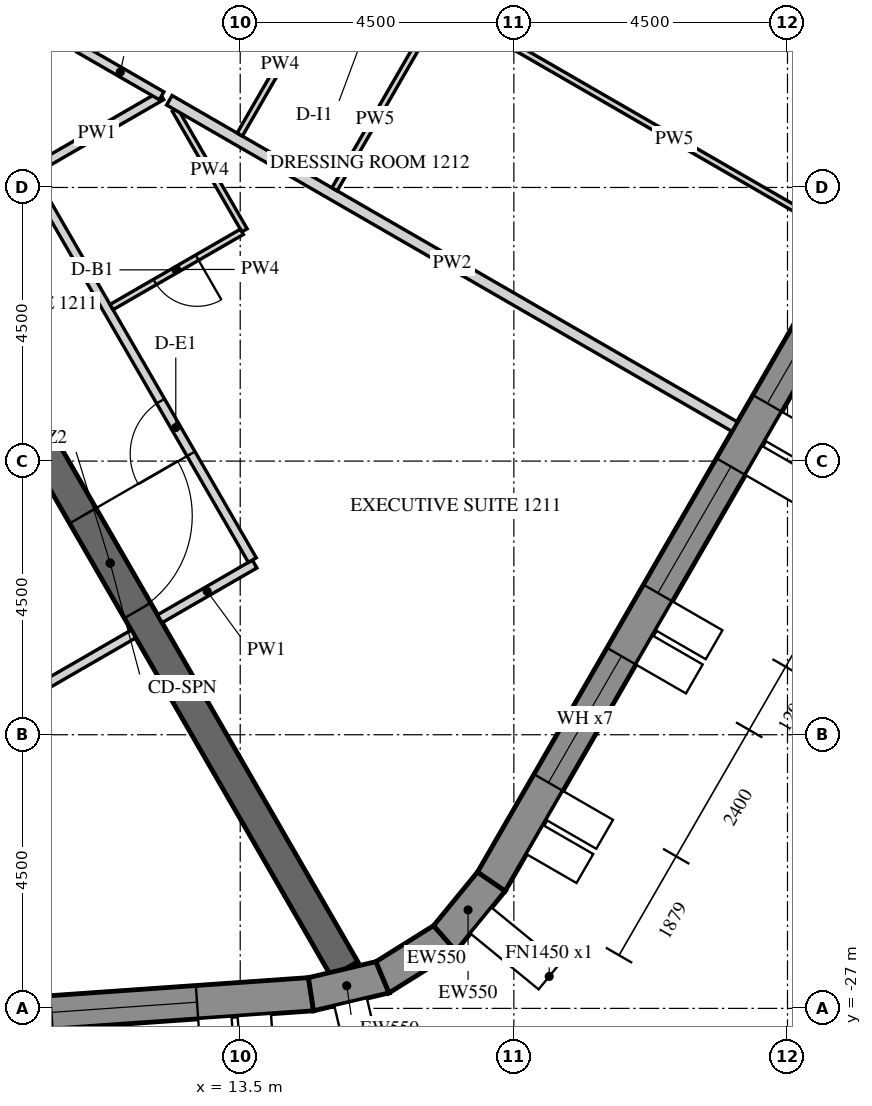
"""IFC4 building model, lengths in metres.
Left out: names, types, materials, properties, quantities, classifications, styles, units other than length and angle.
Written with IfcOpenShell. Run it as: python <this file> out.ifc"""

import sys

from ifc_helpers import new_model, si_unit, direction, frame, frame_2d, origin, place, context, subcontext, project, spatial, polyline, rectangle, outline, extrude, element, fill, save


model = new_model("IFC4")
c1 = context("Model", 3, precision=1e-05, world=origin(), true_north=direction((0.0, 1.0)))
c2 = subcontext(c1, "Body", "Model", "MODEL_VIEW")
j1 = project(units=[si_unit("LENGTHUNIT", "METRE"), si_unit("PLANEANGLEUNIT", "RADIAN")], contexts=[c1])
p1 = place(None, origin())
s1 = spatial("IfcSite", under=j1, at=p1, CompositionType="ELEMENT")
p2 = place(p1, origin())
s2 = spatial("IfcBuilding", under=s1, at=p2, CompositionType="ELEMENT")
p3 = place(p2, frame((0.0, 0.0, 164.4)))
s3 = spatial("IfcBuildingStorey", under=s2, at=p3, CompositionType="ELEMENT", Elevation=164.4)
p4 = place(p3, frame((-13.026, -28.704, -0.15), z_axis=(0.0, 0.0, 1.0), x_axis=(0.99756406806, 0.069756219185, 0.0)))
e1 = element("IfcWall", 1, at=p4, inside=s3, PredefinedType="SOLIDWALL", context=c2, shape_type="SweptSolid", body=[
    extrude(outline(polyline([(-0.026, -0.275), (27.78, -0.275), (27.735, 0.275), (0.026, 0.275), (-0.026, -0.275)])), origin(), (0.0, 0.0, 1.0), 3.9),
])
p5 = place(p4, frame((1.879, 0.0, 1.05)))
e2 = element("IfcOpeningElement", 2, at=p5, cuts=e1, PredefinedType="OPENING", context=c2, shape_type="SweptSolid", body=[
    extrude(rectangle(XDim=2.4, YDim=2.4, at=frame_2d((1.2, 1.2))), frame((0.0, 0.285, 0.0), z_axis=(0.0, -1.0, 0.0), x_axis=(1.0, 0.0, 0.0)), (0.0, 0.0, 1.0), 0.57),
])
p6 = place(p4, frame((5.479, 0.0, 1.05)))
e3 = element("IfcOpeningElement", 3, at=p6, cuts=e1, PredefinedType="OPENING", context=c2, shape_type="SweptSolid", body=[
    extrude(rectangle(XDim=2.4, YDim=2.4, at=frame_2d((1.2, 1.2))), frame((0.0, 0.285, 0.0), z_axis=(0.0, -1.0, 0.0), x_axis=(1.0, 0.0, 0.0)), (0.0, 0.0, 1.0), 0.57),
])
p7 = place(p4, frame((9.079, 0.0, 1.05)))
e4 = element("IfcOpeningElement", 4, at=p7, cuts=e1, PredefinedType="OPENING", context=c2, shape_type="SweptSolid", body=[
    extrude(rectangle(XDim=2.4, YDim=2.4, at=frame_2d((1.2, 1.2))), frame((0.0, 0.285, 0.0), z_axis=(0.0, -1.0, 0.0), x_axis=(1.0, 0.0, 0.0)), (0.0, 0.0, 1.0), 0.57),
])
p8 = place(p4, frame((12.679, 0.0, 1.05)))
e5 = element("IfcOpeningElement", 5, at=p8, cuts=e1, PredefinedType="OPENING", context=c2, shape_type="SweptSolid", body=[
    extrude(rectangle(XDim=2.4, YDim=2.4, at=frame_2d((1.2, 1.2))), frame((0.0, 0.285, 0.0), z_axis=(0.0, -1.0, 0.0), x_axis=(1.0, 0.0, 0.0)), (0.0, 0.0, 1.0), 0.57),
])
p9 = place(p4, frame((16.279, 0.0, 1.05)))
e6 = element("IfcOpeningElement", 6, at=p9, cuts=e1, PredefinedType="OPENING", context=c2, shape_type="SweptSolid", body=[
    extrude(rectangle(XDim=2.4, YDim=2.4, at=frame_2d((1.2, 1.2))), frame((0.0, 0.285, 0.0), z_axis=(0.0, -1.0, 0.0), x_axis=(1.0, 0.0, 0.0)), (0.0, 0.0, 1.0), 0.57),
])
p10 = place(p4, frame((19.879, 0.0, 1.05)))
e7 = element("IfcOpeningElement", 7, at=p10, cuts=e1, PredefinedType="OPENING", context=c2, shape_type="SweptSolid", body=[
    extrude(rectangle(XDim=2.4, YDim=2.4, at=frame_2d((1.2, 1.2))), frame((0.0, 0.285, 0.0), z_axis=(0.0, -1.0, 0.0), x_axis=(1.0, 0.0, 0.0)), (0.0, 0.0, 1.0), 0.57),
])
p11 = place(p4, frame((23.479, 0.0, 1.05)))
e8 = element("IfcOpeningElement", 8, at=p11, cuts=e1, PredefinedType="OPENING", context=c2, shape_type="SweptSolid", body=[
    extrude(rectangle(XDim=2.4, YDim=2.4, at=frame_2d((1.2, 1.2))), frame((0.0, 0.285, 0.0), z_axis=(0.0, -1.0, 0.0), x_axis=(1.0, 0.0, 0.0)), (0.0, 0.0, 1.0), 0.57),
])
p12 = place(p3, frame((14.664, -26.767, -0.15), z_axis=(0.0, 0.0, 1.0), x_axis=(0.973063591128, 0.230536868247, 0.0)))
e9 = element("IfcWall", 9, at=p12, inside=s3, PredefinedType="SOLIDWALL", context=c2, shape_type="SweptSolid", body=[
    extrude(outline(polyline([(-0.022, -0.275), (1.253, -0.275), (1.163, 0.275), (0.022, 0.275), (-0.022, -0.275)])), origin(), (0.0, 0.0, 1.0), 3.9),
])
p13 = place(p3, frame((15.84, -26.489, -0.15), z_axis=(0.0, 0.0, 1.0), x_axis=(0.848009655012, 0.52998077796, 0.0)))
e10 = element("IfcWall", 10, at=p13, inside=s3, PredefinedType="SOLIDWALL", context=c2, shape_type="SweptSolid", body=[
    extrude(outline(polyline([(-0.045, -0.275), (1.253, -0.275), (1.163, 0.275), (0.045, 0.275), (-0.045, -0.275)])), origin(), (0.0, 0.0, 1.0), 3.9),
])
p14 = place(p3, frame((16.864, -25.848, -0.15), z_axis=(0.0, 0.0, 1.0), x_axis=(0.633842757806, 0.773461930787, 0.0)))
e11 = element("IfcWall", 11, at=p14, inside=s3, PredefinedType="SOLIDWALL", context=c2, shape_type="SweptSolid", body=[
    extrude(outline(polyline([(-0.045, -0.275), (1.231, -0.275), (1.186, 0.275), (0.045, 0.275), (-0.045, -0.275)])), origin(), (0.0, 0.0, 1.0), 3.9),
])
p15 = place(p3, frame((17.63, -24.914, -0.15), z_axis=(0.0, 0.0, 1.0), x_axis=(0.499998569178, 0.866026229868, 0.0)))
e12 = element("IfcWall", 12, at=p15, inside=s3, PredefinedType="SOLIDWALL", context=c2, shape_type="SweptSolid", body=[
    extrude(outline(polyline([(-0.022, -0.275), (27.783, -0.275), (27.732, 0.275), (0.022, 0.275), (-0.022, -0.275)])), origin(), (0.0, 0.0, 1.0), 3.9),
])
p16 = place(p15, frame((1.879, 0.0, 1.05)))
e13 = element("IfcOpeningElement", 13, at=p16, cuts=e12, PredefinedType="OPENING", context=c2, shape_type="SweptSolid", body=[
    extrude(rectangle(XDim=2.4, YDim=2.4, at=frame_2d((1.2, 1.2))), frame((0.0, 0.285, 0.0), z_axis=(0.0, -1.0, 0.0), x_axis=(1.0, 0.0, 0.0)), (0.0, 0.0, 1.0), 0.57),
])
p17 = place(p15, frame((5.479, 0.0, 1.05)))
e14 = element("IfcOpeningElement", 14, at=p17, cuts=e12, PredefinedType="OPENING", context=c2, shape_type="SweptSolid", body=[
    extrude(rectangle(XDim=2.4, YDim=2.4, at=frame_2d((1.2, 1.2))), frame((0.0, 0.285, 0.0), z_axis=(0.0, -1.0, 0.0), x_axis=(1.0, 0.0, 0.0)), (0.0, 0.0, 1.0), 0.57),
])
p18 = place(p15, frame((9.079, 0.0, 1.05)))
e15 = element("IfcOpeningElement", 15, at=p18, cuts=e12, PredefinedType="OPENING", context=c2, shape_type="SweptSolid", body=[
    extrude(rectangle(XDim=2.4, YDim=2.4, at=frame_2d((1.2, 1.2))), frame((0.0, 0.285, 0.0), z_axis=(0.0, -1.0, 0.0), x_axis=(1.0, 0.0, 0.0)), (0.0, 0.0, 1.0), 0.57),
])
p19 = place(p15, frame((12.679, 0.0, 1.05)))
e16 = element("IfcOpeningElement", 16, at=p19, cuts=e12, PredefinedType="OPENING", context=c2, shape_type="SweptSolid", body=[
    extrude(rectangle(XDim=2.4, YDim=2.4, at=frame_2d((1.2, 1.2))), frame((0.0, 0.285, 0.0), z_axis=(0.0, -1.0, 0.0), x_axis=(1.0, 0.0, 0.0)), (0.0, 0.0, 1.0), 0.57),
])
p20 = place(p15, frame((16.279, 0.0, 1.05)))
e17 = element("IfcOpeningElement", 17, at=p20, cuts=e12, PredefinedType="OPENING", context=c2, shape_type="SweptSolid", body=[
    extrude(rectangle(XDim=2.4, YDim=2.4, at=frame_2d((1.2, 1.2))), frame((0.0, 0.285, 0.0), z_axis=(0.0, -1.0, 0.0), x_axis=(1.0, 0.0, 0.0)), (0.0, 0.0, 1.0), 0.57),
])
p21 = place(p15, frame((19.879, 0.0, 1.05)))
e18 = element("IfcOpeningElement", 18, at=p21, cuts=e12, PredefinedType="OPENING", context=c2, shape_type="SweptSolid", body=[
    extrude(rectangle(XDim=2.4, YDim=2.4, at=frame_2d((1.2, 1.2))), frame((0.0, 0.285, 0.0), z_axis=(0.0, -1.0, 0.0), x_axis=(1.0, 0.0, 0.0)), (0.0, 0.0, 1.0), 0.57),
])
p22 = place(p15, frame((23.479, 0.0, 1.05)))
e19 = element("IfcOpeningElement", 19, at=p22, cuts=e12, PredefinedType="OPENING", context=c2, shape_type="SweptSolid", body=[
    extrude(rectangle(XDim=2.4, YDim=2.4, at=frame_2d((1.2, 1.2))), frame((0.0, 0.285, 0.0), z_axis=(0.0, -1.0, 0.0), x_axis=(1.0, 0.0, 0.0)), (0.0, 0.0, 1.0), 0.57),
])
p23 = place(p3, frame((7.361, -12.75, -0.15), z_axis=(0.0, 0.0, 1.0), x_axis=(0.50000571537, 0.866022103989, 0.0)))
e20 = element("IfcWall", 20, at=p23, inside=s3, PredefinedType="SHEAR", context=c2, shape_type="SweptSolid", body=[
    extrude(outline(polyline([(-0.144, -0.25), (14.867, -0.25), (14.578, 0.25), (0.144, 0.25), (-0.144, -0.25)])), origin(), (0.0, 0.0, 1.0), 3.9),
])
p24 = place(p23, frame((6.49, 0.0, 0.15)))
e21 = element("IfcOpeningElement", 21, at=p24, cuts=e20, PredefinedType="OPENING", context=c2, shape_type="SweptSolid", body=[
    extrude(rectangle(XDim=1.8, YDim=2.4, at=frame_2d((0.9, 1.2))), frame((0.0, 0.26, 0.0), z_axis=(0.0, -1.0, 0.0), x_axis=(1.0, 0.0, 0.0)), (0.0, 0.0, 1.0), 0.52),
])
p25 = place(p3, frame((7.506, -13.0, -0.15), z_axis=(0.0, 0.0, 1.0), x_axis=(0.499988271576, -0.866032175087, 0.0)))
e22 = element("IfcWall", 22, at=p25, inside=s3, PredefinedType="SHEAR", context=c2, shape_type="SweptSolid", body=[
    extrude(rectangle(XDim=15.424, YDim=0.5, at=frame_2d((7.712, 0.0))), origin(), (0.0, 0.0, 1.0), 3.9),
])
p26 = place(p25, frame((6.812, 0.0, 0.15)))
e23 = element("IfcOpeningElement", 23, at=p26, cuts=e22, PredefinedType="OPENING", context=c2, shape_type="SweptSolid", body=[
    extrude(rectangle(XDim=1.8, YDim=2.4, at=frame_2d((0.9, 1.2))), frame((0.0, 0.26, 0.0), z_axis=(0.0, -1.0, 0.0), x_axis=(1.0, 0.0, 0.0)), (0.0, 0.0, 1.0), 0.52),
])
p27 = place(p3, frame((10.251, -21.705, 0.0), z_axis=(0.0, 0.0, 1.0), x_axis=(0.866013532718, 0.500020560727, 0.0)))
e24 = element("IfcWall", 24, at=p27, inside=s3, PredefinedType="PARTITIONING", context=c2, shape_type="SweptSolid", body=[
    extrude(rectangle(XDim=1.725, YDim=0.15, at=frame_2d((0.863, 0.0))), origin(), (0.0, 0.0, 1.0), 2.988),
])
p28 = place(p3, frame((12.178, -20.593, 0.0), z_axis=(0.0, 0.0, 1.0), x_axis=(0.866047807691, 0.499961193289, 0.0)))
e25 = element("IfcWall", 25, at=p28, inside=s3, PredefinedType="PARTITIONING", context=c2, shape_type="SweptSolid", body=[
    extrude(rectangle(XDim=1.8, YDim=0.15, at=frame_2d((0.9, 0.0))), origin(), (0.0, 0.0, 1.0), 2.988),
])
p29 = place(p3, frame((13.699, -19.628, 0.0), z_axis=(0.0, 0.0, 1.0), x_axis=(-0.499995202058, 0.86602817386, 0.0)))
e26 = element("IfcWall", 26, at=p29, inside=s3, PredefinedType="PARTITIONING", context=c2, shape_type="SweptSolid", body=[
    extrude(rectangle(XDim=7.361, YDim=0.15, at=frame_2d((3.68, 0.0))), origin(), (0.0, 0.0, 1.0), 2.988),
])
p30 = place(p29, frame((2.018, 0.0, 0.0)))
e27 = element("IfcOpeningElement", 27, at=p30, cuts=e26, PredefinedType="OPENING", context=c2, shape_type="SweptSolid", body=[
    extrude(rectangle(XDim=1.0, YDim=2.1, at=frame_2d((0.5, 1.05))), frame((0.0, 0.085, 0.0), z_axis=(0.0, -1.0, 0.0), x_axis=(1.0, 0.0, 0.0)), (0.0, 0.0, 1.0), 0.17),
])
p31 = place(p3, frame((10.084, -13.216, 0.0), z_axis=(0.0, 0.0, 1.0), x_axis=(0.866026229868, 0.499998569178, 0.0)))
e28 = element("IfcWall", 28, at=p31, inside=s3, PredefinedType="PARTITIONING", context=c2, shape_type="SweptSolid", body=[
    extrude(rectangle(XDim=2.449, YDim=0.15, at=frame_2d((1.225, 0.0))), origin(), (0.0, 0.0, 1.0), 2.988),
])
p32 = place(p3, frame((12.208, -11.993, 0.0), z_axis=(0.0, 0.0, 1.0), x_axis=(-0.866011891242, 0.50002340368, 0.0)))
e29 = element("IfcWall", 29, at=p32, inside=s3, PredefinedType="PARTITIONING", context=c2, shape_type="SweptSolid", body=[
    extrude(rectangle(XDim=1.568, YDim=0.15, at=frame_2d((0.784, 0.0))), origin(), (0.0, 0.0, 1.0), 2.988),
])
p33 = place(p3, frame((12.426, -12.223, 0.0), z_axis=(0.0, 0.0, 1.0), x_axis=(0.499959451571, -0.866048813165, 0.0)))
e30 = element("IfcWall", 30, at=p33, inside=s3, PredefinedType="PARTITIONING", context=c2, shape_type="SweptSolid", body=[
    extrude(rectangle(XDim=2.289, YDim=0.1, at=frame_2d((1.145, 0.0))), origin(), (0.0, 0.0, 1.0), 2.988),
])
p34 = place(p3, frame((13.527, -14.23, 0.0), z_axis=(0.0, 0.0, 1.0), x_axis=(-0.866006523861, -0.500032699561, 0.0)))
e31 = element("IfcWall", 31, at=p34, inside=s3, PredefinedType="PARTITIONING", context=c2, shape_type="SweptSolid", body=[
    extrude(rectangle(XDim=2.475, YDim=0.1, at=frame_2d((1.237, 0.0))), origin(), (0.0, 0.0, 1.0), 2.988),
])
p35 = place(p34, frame((0.85, 0.0, 0.0)))
e32 = element("IfcOpeningElement", 32, at=p35, cuts=e31, PredefinedType="OPENING", context=c2, shape_type="SweptSolid", body=[
    extrude(rectangle(XDim=0.8, YDim=2.1, at=frame_2d((0.4, 1.05))), frame((0.0, 0.06, 0.0), z_axis=(0.0, -1.0, 0.0), x_axis=(1.0, 0.0, 0.0)), (0.0, 0.0, 1.0), 0.12),
])
p36 = place(p3, frame((21.631, -17.433, 0.0), z_axis=(0.0, 0.0, 1.0), x_axis=(-0.866030310389, 0.499991501415, 0.0)))
e33 = element("IfcWall", 33, at=p36, inside=s3, PredefinedType="PARTITIONING", context=c2, shape_type="SweptSolid", body=[
    extrude(rectangle(XDim=10.735, YDim=0.18, at=frame_2d((5.368, 0.0))), origin(), (0.0, 0.0, 1.0), 2.988),
])
p37 = place(p3, frame((16.381, -11.227, 0.0), z_axis=(0.0, 0.0, 1.0), x_axis=(-0.500008456887, -0.866020521143, 0.0)))
e34 = element("IfcWall", 34, at=p37, inside=s3, PredefinedType="PARTITIONING", context=c2, shape_type="SweptSolid", body=[
    extrude(rectangle(XDim=2.66, YDim=0.1, at=frame_2d((1.33, 0.0))), origin(), (0.0, 0.0, 1.0), 2.988),
])
p38 = place(p3, frame((23.431, -14.316, 0.0), z_axis=(0.0, 0.0, 1.0), x_axis=(-0.86603809205, 0.499978022635, 0.0)))
e35 = element("IfcWall", 35, at=p38, inside=s3, PredefinedType="PARTITIONING", context=c2, shape_type="SweptSolid", body=[
    extrude(rectangle(XDim=6.45, YDim=0.1, at=frame_2d((3.225, 0.0))), origin(), (0.0, 0.0, 1.0), 2.988),
])
p39 = place(p3, frame((13.492, -12.63, 0.0), z_axis=(0.0, 0.0, 1.0), x_axis=(0.50004820116, 0.865997573043, 0.0)))
e36 = element("IfcWall", 36, at=p39, inside=s3, PredefinedType="PARTITIONING", context=c2, shape_type="SweptSolid", body=[
    extrude(rectangle(XDim=2.66, YDim=0.1, at=frame_2d((1.33, 0.0))), origin(), (0.0, 0.0, 1.0), 2.988),
])
p40 = place(p11, frame((0.0, 0.205, 0.0)))
e37 = element("IfcWindow", 37, at=p40, inside=s3, PartitioningType="DOUBLE_PANEL_VERTICAL", PredefinedType="WINDOW", context=c2, shape_type="SweptSolid", body=[
    extrude(rectangle(XDim=2.4, YDim=2.4, at=frame_2d((1.2, 1.2))), frame((0.0, 0.03, 0.0), z_axis=(0.0, -1.0, 0.0), x_axis=(1.0, 0.0, 0.0)), (0.0, 0.0, 1.0), 0.06),
])
fill(e8, e37)
p41 = place(p16, frame((0.0, 0.205, 0.0)))
e38 = element("IfcWindow", 38, at=p41, inside=s3, PartitioningType="DOUBLE_PANEL_VERTICAL", PredefinedType="WINDOW", context=c2, shape_type="SweptSolid", body=[
    extrude(rectangle(XDim=2.4, YDim=2.4, at=frame_2d((1.2, 1.2))), frame((0.0, 0.03, 0.0), z_axis=(0.0, -1.0, 0.0), x_axis=(1.0, 0.0, 0.0)), (0.0, 0.0, 1.0), 0.06),
])
fill(e13, e38)
p42 = place(p17, frame((0.0, 0.205, 0.0)))
e39 = element("IfcWindow", 39, at=p42, inside=s3, PartitioningType="DOUBLE_PANEL_VERTICAL", PredefinedType="WINDOW", context=c2, shape_type="SweptSolid", body=[
    extrude(rectangle(XDim=2.4, YDim=2.4, at=frame_2d((1.2, 1.2))), frame((0.0, 0.03, 0.0), z_axis=(0.0, -1.0, 0.0), x_axis=(1.0, 0.0, 0.0)), (0.0, 0.0, 1.0), 0.06),
])
fill(e14, e39)
p43 = place(p18, frame((0.0, 0.205, 0.0)))
e40 = element("IfcWindow", 40, at=p43, inside=s3, PartitioningType="DOUBLE_PANEL_VERTICAL", PredefinedType="WINDOW", context=c2, shape_type="SweptSolid", body=[
    extrude(rectangle(XDim=2.4, YDim=2.4, at=frame_2d((1.2, 1.2))), frame((0.0, 0.03, 0.0), z_axis=(0.0, -1.0, 0.0), x_axis=(1.0, 0.0, 0.0)), (0.0, 0.0, 1.0), 0.06),
])
fill(e15, e40)
p44 = place(p26, origin())
e41 = element("IfcDoor", 41, at=p44, inside=s3, OperationType="DOUBLE_DOOR_SINGLE_SWING", PredefinedType="DOOR", context=c2, shape_type="SweptSolid", body=[
    extrude(rectangle(XDim=1.8, YDim=2.4, at=frame_2d((0.9, 1.2))), frame((0.0, 0.025, 0.0), z_axis=(0.0, -1.0, 0.0), x_axis=(1.0, 0.0, 0.0)), (0.0, 0.0, 1.0), 0.05),
])
fill(e23, e41)
p45 = place(p30, origin())
e42 = element("IfcDoor", 42, at=p45, inside=s3, OperationType="SINGLE_SWING_LEFT", PredefinedType="DOOR", context=c2, shape_type="SweptSolid", body=[
    extrude(rectangle(XDim=1.0, YDim=2.1, at=frame_2d((0.5, 1.05))), frame((0.0, 0.025, 0.0), z_axis=(0.0, -1.0, 0.0), x_axis=(1.0, 0.0, 0.0)), (0.0, 0.0, 1.0), 0.05),
])
fill(e27, e42)
p46 = place(p35, origin())
e43 = element("IfcDoor", 43, at=p46, inside=s3, OperationType="SINGLE_SWING_RIGHT", PredefinedType="DOOR", context=c2, shape_type="SweptSolid", body=[
    extrude(rectangle(XDim=0.8, YDim=2.1, at=frame_2d((0.4, 1.05))), frame((0.0, 0.025, 0.0), z_axis=(0.0, -1.0, 0.0), x_axis=(1.0, 0.0, 0.0)), (0.0, 0.0, 1.0), 0.05),
])
fill(e32, e43)
save(model, sys.argv[1])
